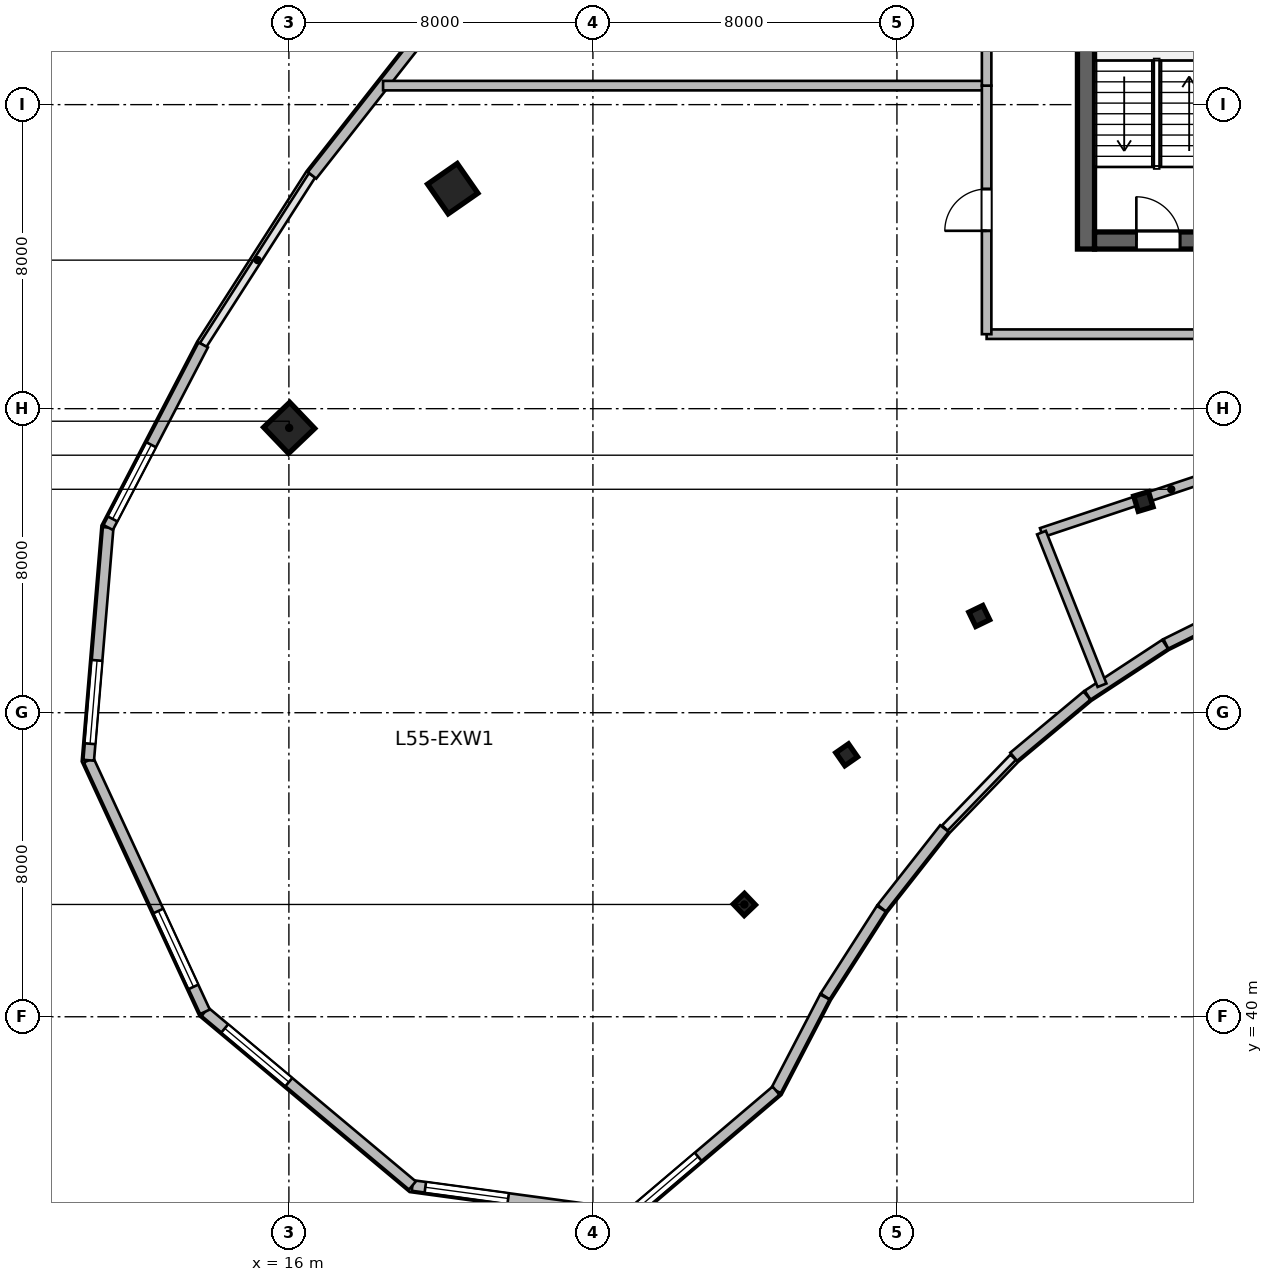
"""IFC4 building model, lengths in metres.
Left out: names, types, materials, properties, quantities, classifications, styles, units other than length and angle.
Written with IfcOpenShell. Run it as: python <this file> out.ifc"""

import sys

from ifc_helpers import new_model, si_unit, direction, frame, frame_2d, origin, origin_2d, place, context, subcontext, project, spatial, rectangle, i_section, extrude, source, transform, mapped, element, fill, save


model = new_model("IFC4")
c1 = context("Model", 3, precision=1e-05, world=origin(), true_north=direction((0.0, 1.0)))
c2 = subcontext(c1, "Body", "Model", "MODEL_VIEW")
j1 = project(units=[si_unit("LENGTHUNIT", "METRE"), si_unit("PLANEANGLEUNIT", "RADIAN")], contexts=[c1])
p1 = place(None, origin())
s1 = spatial("IfcSite", under=j1, at=p1, CompositionType="ELEMENT")
p2 = place(p1, origin())
s2 = spatial("IfcBuilding", under=s1, at=p2, CompositionType="ELEMENT")
p3 = place(p2, frame((0.0, 0.0, 227.4)))
s3 = spatial("IfcBuildingStorey", under=s2, at=p3, CompositionType="ELEMENT", Elevation=227.4)
m1 = source(origin(), c2, "Body", "SweptSolid", [
    extrude(rectangle(XDim=12.0, YDim=0.45, at=frame_2d((6.0, 0.0))), origin(), (0.0, 0.0, 1.0), 3.9),
])
p4 = place(p3, frame((36.975, 60.2, 0.0), z_axis=(0.0, 0.0, 1.0), x_axis=(0.0, 1.0, 0.0)))
e1 = element("IfcWall", 1, at=p4, inside=s3, PredefinedType="SHEAR", context=c2, shape_type="MappedRepresentation", body=[
    mapped(m1, transform((0.0, 0.0, 0.0), scale=1.0)),
])
m2 = source(origin(), c2, "Body", "SweptSolid", [
    extrude(rectangle(XDim=21.6, YDim=0.45, at=frame_2d((10.8, 0.0))), origin(), (0.0, 0.0, 1.0), 3.9),
])
p5 = place(p3, frame((37.2, 60.425, 0.0), z_axis=(0.0, 0.0, 1.0), x_axis=(1.0, 0.0, 0.0)))
e2 = element("IfcWall", 2, at=p5, inside=s3, PredefinedType="SHEAR", context=c2, shape_type="MappedRepresentation", body=[
    mapped(m2, transform((0.0, 0.0, 0.0), scale=1.0)),
])
p6 = place(p5, frame((1.1, 0.0, 0.0)))
e3 = element("IfcOpeningElement", 3, at=p6, cuts=e2, PredefinedType="OPENING", context=c2, shape_type="SweptSolid", body=[
    extrude(rectangle(XDim=1.15, YDim=2.15, at=frame_2d((0.575, 1.075))), frame((0.0, 0.235, 0.0), z_axis=(0.0, -1.0, 0.0), x_axis=(1.0, 0.0, 0.0)), (0.0, 0.0, 1.0), 0.47),
])
p7 = place(p5, frame((19.5, 0.0, 0.0)))
e4 = element("IfcOpeningElement", 4, at=p7, cuts=e2, PredefinedType="OPENING", context=c2, shape_type="SweptSolid", body=[
    extrude(rectangle(XDim=0.9, YDim=2.1, at=frame_2d((0.45, 1.05))), frame((0.0, 0.235, 0.0), z_axis=(0.0, -1.0, 0.0), x_axis=(1.0, 0.0, 0.0)), (0.0, 0.0, 1.0), 0.47),
])
p8 = place(p5, frame((12.02, 0.0, 0.0)))
e5 = element("IfcOpeningElement", 5, at=p8, cuts=e2, PredefinedType="OPENING", context=c2, shape_type="SweptSolid", body=[
    extrude(rectangle(XDim=1.6, YDim=2.15, at=frame_2d((0.8, 1.075))), frame((0.0, 0.235, 0.0), z_axis=(0.0, -1.0, 0.0), x_axis=(1.0, 0.0, 0.0)), (0.0, 0.0, 1.0), 0.47),
])
m3 = source(origin(), c2, "Body", "SweptSolid", [
    extrude(i_section(OverallWidth=0.406, OverallDepth=0.416, WebThickness=0.03, FlangeThickness=0.048, at=origin_2d()), origin(), (0.0, 0.0, 1.0), 3.9),
])
p9 = place(p3, frame((27.985, 42.955, 0.0), z_axis=(0.0, 0.0, 1.0), x_axis=(-0.690756218984, 0.723087716626, 0.0)))
e6 = element("IfcColumn", 6, at=p9, inside=s3, PredefinedType="COLUMN", context=c2, shape_type="MappedRepresentation", body=[
    mapped(m3, transform((0.0, 0.0, 0.0), scale=1.0)),
])
m4 = source(origin(), c2, "Body", "SweptSolid", [
    extrude(rectangle(XDim=0.95, YDim=0.95, at=origin_2d()), origin(), (0.0, 0.0, 1.0), 3.9),
])
p10 = place(p3, frame((16.007, 55.494, 0.0), z_axis=(0.0, 0.0, 1.0), x_axis=(-0.690756218984, 0.723087716626, 0.0)))
e7 = element("IfcColumn", 7, at=p10, inside=s3, PredefinedType="COLUMN", context=c2, shape_type="MappedRepresentation", body=[
    mapped(m4, transform((0.0, 0.0, 0.0), scale=1.0)),
])
p11 = place(p3, frame((30.677, 46.892, 0.0), z_axis=(0.0, 0.0, 1.0), x_axis=(-0.571143442153, 0.820850271661, 0.0)))
e8 = element("IfcColumn", 8, at=p11, inside=s3, PredefinedType="COLUMN", context=c2, shape_type="MappedRepresentation", body=[
    mapped(m3, transform((0.0, 0.0, 0.0), scale=1.0)),
])
p12 = place(p3, frame((20.311, 61.789, 0.0), z_axis=(0.0, 0.0, 1.0), x_axis=(-0.571143442153, 0.820850271661, 0.0)))
e9 = element("IfcColumn", 9, at=p12, inside=s3, PredefinedType="COLUMN", context=c2, shape_type="MappedRepresentation", body=[
    mapped(m4, transform((0.0, 0.0, 0.0), scale=1.0)),
])
for number, where, z_axis, x_axis in (
    (10, (34.166, 50.545, 0.0), (0.0, 0.0, 1.0), (-0.436, 0.9, 0.0)),
    (11, (38.485, 53.558, 0.0), (0.0, 0.0, 1.0), (-0.289, 0.957, 0.0)),
):
    element("IfcColumn", number, at=place(p3, frame(where, z_axis=z_axis, x_axis=x_axis)), inside=s3, PredefinedType="COLUMN", context=c2, shape_type="MappedRepresentation", body=[
        mapped(m3, transform((0.0, 0.0, 0.0), scale=1.0)),
    ])
m5 = source(origin(), c2, "Body", "SweptSolid", [
    extrude(rectangle(XDim=2.378, YDim=0.28, at=frame_2d((1.189, 0.0))), origin(), (0.0, 0.0, 1.0), 3.65),
])
p13 = place(p3, frame((41.207, 50.868, 0.0), z_axis=(0.0, 0.0, 1.0), x_axis=(-0.895941616831, -0.444171835252, 0.0)))
e12 = element("IfcWall", 12, at=p13, inside=s3, PredefinedType="SOLIDWALL", context=c2, shape_type="MappedRepresentation", body=[
    mapped(m5, transform((0.0, 0.0, 0.0), scale=1.0)),
])
m6 = source(origin(), c2, "Body", "SweptSolid", [
    extrude(rectangle(XDim=2.44, YDim=0.28, at=frame_2d((1.22, 0.0))), origin(), (0.0, 0.0, 1.0), 3.65),
])
p14 = place(p3, frame((39.057, 49.801, 0.0), z_axis=(0.0, 0.0, 1.0), x_axis=(-0.83598480459, -0.548752591333, 0.0)))
e13 = element("IfcWall", 13, at=p14, inside=s3, PredefinedType="SOLIDWALL", context=c2, shape_type="MappedRepresentation", body=[
    mapped(m6, transform((0.0, 0.0, 0.0), scale=1.0)),
])
m7 = source(origin(), c2, "Body", "SweptSolid", [
    extrude(rectangle(XDim=2.511, YDim=0.28, at=frame_2d((1.256, 0.0))), origin(), (0.0, 0.0, 1.0), 3.65),
])
p15 = place(p3, frame((37.001, 48.449, 0.0), z_axis=(0.0, 0.0, 1.0), x_axis=(-0.767910416122, -0.640557251782, 0.0)))
e14 = element("IfcWall", 14, at=p15, inside=s3, PredefinedType="SOLIDWALL", context=c2, shape_type="MappedRepresentation", body=[
    mapped(m7, transform((0.0, 0.0, 0.0), scale=1.0)),
])
m8 = source(origin(), c2, "Body", "SweptSolid", [
    extrude(rectangle(XDim=2.666, YDim=0.28, at=frame_2d((1.333, 0.0))), origin(), (0.0, 0.0, 1.0), 3.65),
])
p16 = place(p3, frame((33.249, 44.952, 0.0), z_axis=(0.0, 0.0, 1.0), x_axis=(-0.618161284122, -0.786051287648, 0.0)))
e15 = element("IfcWall", 15, at=p16, inside=s3, PredefinedType="SOLIDWALL", context=c2, shape_type="MappedRepresentation", body=[
    mapped(m8, transform((0.0, 0.0, 0.0), scale=1.0)),
])
m9 = source(origin(), c2, "Body", "SweptSolid", [
    extrude(rectangle(XDim=2.742, YDim=0.28, at=frame_2d((1.371, 0.0))), origin(), (0.0, 0.0, 1.0), 3.65),
])
p17 = place(p3, frame((31.591, 42.843, 0.0), z_axis=(0.0, 0.0, 1.0), x_axis=(-0.540172468355, -0.841554338371, 0.0)))
e16 = element("IfcWall", 16, at=p17, inside=s3, PredefinedType="SOLIDWALL", context=c2, shape_type="MappedRepresentation", body=[
    mapped(m9, transform((0.0, 0.0, 0.0), scale=1.0)),
])
m10 = source(origin(), c2, "Body", "SweptSolid", [
    extrude(rectangle(XDim=2.779, YDim=0.28, at=frame_2d((1.39, 0.0))), origin(), (0.0, 0.0, 1.0), 3.65),
])
p18 = place(p3, frame((30.101, 40.521, 0.0), z_axis=(0.0, 0.0, 1.0), x_axis=(-0.461770308601, -0.886999538948, 0.0)))
e17 = element("IfcWall", 17, at=p18, inside=s3, PredefinedType="SOLIDWALL", context=c2, shape_type="MappedRepresentation", body=[
    mapped(m10, transform((0.0, 0.0, 0.0), scale=1.0)),
])
m11 = source(origin(), c2, "Body", "SweptSolid", [
    extrude(rectangle(XDim=5.051, YDim=0.28, at=frame_2d((2.525, 0.0))), origin(), (0.0, 0.0, 1.0), 3.65),
])
p19 = place(p3, frame((28.818, 38.056, 0.0), z_axis=(0.0, 0.0, 1.0), x_axis=(-0.761904731537, -0.647689107568, 0.0)))
e18 = element("IfcWall", 18, at=p19, inside=s3, PredefinedType="SOLIDWALL", context=c2, shape_type="MappedRepresentation", body=[
    mapped(m11, transform((0.0, 0.0, 0.0), scale=1.0)),
])
p20 = place(p19, frame((2.688, 0.0, 0.95)))
e19 = element("IfcOpeningElement", 19, at=p20, cuts=e18, PredefinedType="OPENING", context=c2, shape_type="SweptSolid", body=[
    extrude(rectangle(XDim=2.2, YDim=2.1, at=frame_2d((1.1, 1.05))), frame((0.0, 0.15, 0.0), z_axis=(0.0, -1.0, 0.0), x_axis=(1.0, 0.0, 0.0)), (0.0, 0.0, 1.0), 0.3),
])
m12 = source(origin(), c2, "Body", "SweptSolid", [
    extrude(rectangle(XDim=5.771, YDim=0.28, at=frame_2d((2.886, 0.0))), origin(), (0.0, 0.0, 1.0), 3.65),
])
p21 = place(p3, frame((24.969, 34.784, 0.0), z_axis=(0.0, 0.0, 1.0), x_axis=(-0.990933615537, 0.134352408237, 0.0)))
e20 = element("IfcWall", 20, at=p21, inside=s3, PredefinedType="SOLIDWALL", context=c2, shape_type="MappedRepresentation", body=[
    mapped(m12, transform((0.0, 0.0, 0.0), scale=1.0)),
])
p22 = place(p21, frame((3.229, 0.0, 0.95)))
e21 = element("IfcOpeningElement", 21, at=p22, cuts=e20, PredefinedType="OPENING", context=c2, shape_type="SweptSolid", body=[
    extrude(rectangle(XDim=2.2, YDim=2.1, at=frame_2d((1.1, 1.05))), frame((0.0, 0.15, 0.0), z_axis=(0.0, -1.0, 0.0), x_axis=(1.0, 0.0, 0.0)), (0.0, 0.0, 1.0), 0.3),
])
m13 = source(origin(), c2, "Body", "SweptSolid", [
    extrude(rectangle(XDim=7.12, YDim=0.28, at=frame_2d((3.56, 0.0))), origin(), (0.0, 0.0, 1.0), 3.65),
])
p23 = place(p3, frame((19.25, 35.56, 0.0), z_axis=(0.0, 0.0, 1.0), x_axis=(-0.766709783564, 0.641993853387, 0.0)))
e22 = element("IfcWall", 22, at=p23, inside=s3, PredefinedType="SOLIDWALL", context=c2, shape_type="MappedRepresentation", body=[
    mapped(m13, transform((0.0, 0.0, 0.0), scale=1.0)),
])
p24 = place(p23, frame((4.24, 0.0, 0.95)))
e23 = element("IfcOpeningElement", 23, at=p24, cuts=e22, PredefinedType="OPENING", context=c2, shape_type="SweptSolid", body=[
    extrude(rectangle(XDim=2.2, YDim=2.1, at=frame_2d((1.1, 1.05))), frame((0.0, 0.15, 0.0), z_axis=(0.0, -1.0, 0.0), x_axis=(1.0, 0.0, 0.0)), (0.0, 0.0, 1.0), 0.3),
])
m14 = source(origin(), c2, "Body", "SweptSolid", [
    extrude(rectangle(XDim=7.292, YDim=0.28, at=frame_2d((3.646, 0.0))), origin(), (0.0, 0.0, 1.0), 3.65),
])
p25 = place(p3, frame((13.792, 40.131, 0.0), z_axis=(0.0, 0.0, 1.0), x_axis=(-0.419642001049, 0.907689699708, 0.0)))
e24 = element("IfcWall", 24, at=p25, inside=s3, PredefinedType="SOLIDWALL", context=c2, shape_type="MappedRepresentation", body=[
    mapped(m14, transform((0.0, 0.0, 0.0), scale=1.0)),
])
p26 = place(p25, frame((0.723, 0.0, 0.95)))
e25 = element("IfcOpeningElement", 25, at=p26, cuts=e24, PredefinedType="OPENING", context=c2, shape_type="SweptSolid", body=[
    extrude(rectangle(XDim=2.2, YDim=2.1, at=frame_2d((1.1, 1.05))), frame((0.0, 0.15, 0.0), z_axis=(0.0, -1.0, 0.0), x_axis=(1.0, 0.0, 0.0)), (0.0, 0.0, 1.0), 0.3),
])
m15 = source(origin(), c2, "Body", "SweptSolid", [
    extrude(rectangle(XDim=6.146, YDim=0.28, at=frame_2d((3.073, 0.0))), origin(), (0.0, 0.0, 1.0), 3.65),
])
p27 = place(p3, frame((10.732, 46.749, 0.0), z_axis=(0.0, 0.0, 1.0), x_axis=(0.083301904456, 0.996524356307, 0.0)))
e26 = element("IfcWall", 26, at=p27, inside=s3, PredefinedType="SOLIDWALL", context=c2, shape_type="MappedRepresentation", body=[
    mapped(m15, transform((0.0, 0.0, 0.0), scale=1.0)),
])
p28 = place(p27, frame((0.436, 0.0, 0.95)))
e27 = element("IfcOpeningElement", 27, at=p28, cuts=e26, PredefinedType="OPENING", context=c2, shape_type="SweptSolid", body=[
    extrude(rectangle(XDim=2.2, YDim=2.1, at=frame_2d((1.1, 1.05))), frame((0.0, 0.15, 0.0), z_axis=(0.0, -1.0, 0.0), x_axis=(1.0, 0.0, 0.0)), (0.0, 0.0, 1.0), 0.3),
])
m16 = source(origin(), c2, "Body", "SweptSolid", [
    extrude(rectangle(XDim=5.416, YDim=0.28, at=frame_2d((2.708, 0.0))), origin(), (0.0, 0.0, 1.0), 3.65),
])
p29 = place(p3, frame((11.244, 52.874, 0.0), z_axis=(0.0, 0.0, 1.0), x_axis=(0.46177852435, 0.886995261796, 0.0)))
e28 = element("IfcWall", 28, at=p29, inside=s3, PredefinedType="SOLIDWALL", context=c2, shape_type="MappedRepresentation", body=[
    mapped(m16, transform((0.0, 0.0, 0.0), scale=1.0)),
])
p30 = place(p29, frame((0.254, 0.0, 0.95)))
e29 = element("IfcOpeningElement", 29, at=p30, cuts=e28, PredefinedType="OPENING", context=c2, shape_type="SweptSolid", body=[
    extrude(rectangle(XDim=2.2, YDim=2.1, at=frame_2d((1.1, 1.05))), frame((0.0, 0.15, 0.0), z_axis=(0.0, -1.0, 0.0), x_axis=(1.0, 0.0, 0.0)), (0.0, 0.0, 1.0), 0.3),
])
m17 = source(origin(), c2, "Body", "SweptSolid", [
    extrude(rectangle(XDim=5.153, YDim=0.28, at=frame_2d((2.577, 0.0))), origin(), (0.0, 0.0, 1.0), 3.65),
])
p31 = place(p3, frame((16.609, 62.14, 0.0), z_axis=(0.0, 0.0, 1.0), x_axis=(0.618179283891, 0.786037132054, 0.0)))
e30 = element("IfcWall", 30, at=p31, inside=s3, PredefinedType="SOLIDWALL", context=c2, shape_type="MappedRepresentation", body=[
    mapped(m17, transform((0.0, 0.0, 0.0), scale=1.0)),
])
m18 = source(origin(), c2, "Body", "SweptSolid", [
    extrude(rectangle(XDim=12.86, YDim=0.25, at=frame_2d((6.43, 0.0))), origin(), (0.0, 0.0, 1.0), 3.095),
])
p32 = place(p3, frame((35.803, 52.738, 0.0), z_axis=(0.0, 0.0, 1.0), x_axis=(0.948466647997, 0.316876975554, 0.0)))
e31 = element("IfcWall", 31, at=p32, inside=s3, PredefinedType="PARTITIONING", context=c2, shape_type="MappedRepresentation", body=[
    mapped(m18, transform((0.0, 0.0, 0.0), scale=1.0)),
])
p33 = place(p32, frame((5.88, 0.0, 0.0)))
e32 = element("IfcOpeningElement", 32, at=p33, cuts=e31, PredefinedType="OPENING", context=c2, shape_type="SweptSolid", body=[
    extrude(rectangle(XDim=1.1, YDim=2.15, at=frame_2d((0.55, 1.075))), frame((0.0, 0.135, 0.0), z_axis=(0.0, -1.0, 0.0), x_axis=(1.0, 0.0, 0.0)), (0.0, 0.0, 1.0), 0.27),
])
m19 = source(origin(), c2, "Body", "SweptSolid", [
    extrude(rectangle(XDim=4.32, YDim=0.25, at=frame_2d((2.16, 0.0))), origin(), (0.0, 0.0, 1.0), 3.65),
])
p34 = place(p3, frame((37.396, 48.723, 0.0), z_axis=(0.0, 0.0, 1.0), x_axis=(-0.368846295269, 0.929490403644, 0.0)))
e33 = element("IfcWall", 33, at=p34, inside=s3, PredefinedType="PARTITIONING", context=c2, shape_type="MappedRepresentation", body=[
    mapped(m19, transform((0.0, 0.0, 0.0), scale=1.0)),
])
m20 = source(origin(), c2, "Body", "SweptSolid", [
    extrude(rectangle(XDim=12.39, YDim=0.25, at=frame_2d((6.195, 0.0))), origin(), (0.0, 0.0, 1.0), 3.217),
])
p35 = place(p3, frame((34.36, 57.96, 0.0), z_axis=(0.0, 0.0, 1.0), x_axis=(1.0, 0.0, 0.0)))
e34 = element("IfcWall", 34, at=p35, inside=s3, PredefinedType="PARTITIONING", context=c2, shape_type="MappedRepresentation", body=[
    mapped(m20, transform((0.0, 0.0, 0.0), scale=1.0)),
])
m21 = source(origin(), c2, "Body", "SweptSolid", [
    extrude(rectangle(XDim=15.882, YDim=0.25, at=frame_2d((7.941, 0.0))), origin(), (0.0, 0.0, 1.0), 3.65),
])
p36 = place(p3, frame((18.478, 64.5, 0.0), z_axis=(0.0, 0.0, 1.0), x_axis=(1.0, 0.0, 0.0)))
e35 = element("IfcWall", 35, at=p36, inside=s3, PredefinedType="PARTITIONING", context=c2, shape_type="MappedRepresentation", body=[
    mapped(m21, transform((0.0, 0.0, 0.0), scale=1.0)),
])
m22 = source(origin(), c2, "Body", "SweptSolid", [
    extrude(rectangle(XDim=6.54, YDim=0.25, at=frame_2d((3.27, 0.0))), origin(), (0.0, 0.0, 1.0), 3.65),
])
p37 = place(p3, frame((34.36, 57.96, 0.0), z_axis=(0.0, 0.0, 1.0), x_axis=(0.0, 1.0, 0.0)))
e36 = element("IfcWall", 36, at=p37, inside=s3, PredefinedType="PARTITIONING", context=c2, shape_type="MappedRepresentation", body=[
    mapped(m22, transform((0.0, 0.0, 0.0), scale=1.0)),
])
p38 = place(p37, frame((2.72, 0.0, 0.0)))
e37 = element("IfcOpeningElement", 37, at=p38, cuts=e36, PredefinedType="OPENING", context=c2, shape_type="SweptSolid", body=[
    extrude(rectangle(XDim=1.1, YDim=2.15, at=frame_2d((0.55, 1.075))), frame((0.0, 0.135, 0.0), z_axis=(0.0, -1.0, 0.0), x_axis=(1.0, 0.0, 0.0)), (0.0, 0.0, 1.0), 0.27),
])
m23 = source(origin(), c2, "Body", "SweptSolid", [
    extrude(rectangle(XDim=12.669, YDim=0.25, at=frame_2d((6.334, 0.0))), origin(), (0.0, 0.0, 1.0), 3.65),
])
p39 = place(p3, frame((34.36, 64.5, 0.0), z_axis=(0.0, 0.0, 1.0), x_axis=(0.0, 1.0, 0.0)))
e38 = element("IfcWall", 38, at=p39, inside=s3, PredefinedType="PARTITIONING", context=c2, shape_type="MappedRepresentation", body=[
    mapped(m23, transform((0.0, 0.0, 0.0), scale=1.0)),
])
p40 = place(p39, frame((5.784, 0.0, 0.0)))
e39 = element("IfcOpeningElement", 39, at=p40, cuts=e38, PredefinedType="OPENING", context=c2, shape_type="SweptSolid", body=[
    extrude(rectangle(XDim=1.1, YDim=2.15, at=frame_2d((0.55, 1.075))), frame((0.0, 0.135, 0.0), z_axis=(0.0, -1.0, 0.0), x_axis=(1.0, 0.0, 0.0)), (0.0, 0.0, 1.0), 0.27),
])
m24 = source(origin(), c2, "Body", "SweptSolid", [
    extrude(rectangle(XDim=2.2, YDim=2.1, at=frame_2d((1.1, 1.05))), frame((0.0, 0.03, 0.0), z_axis=(0.0, -1.0, 0.0), x_axis=(1.0, 0.0, 0.0)), (0.0, 0.0, 1.0), 0.06),
])
p41 = place(p20, origin())
e40 = element("IfcWindow", 40, at=p41, inside=s3, PartitioningType="TRIPLE_PANEL_VERTICAL", PredefinedType="WINDOW", context=c2, shape_type="MappedRepresentation", body=[
    mapped(m24, transform((0.0, 0.0, 0.0), scale=1.0)),
])
fill(e19, e40)
p42 = place(p22, origin())
e41 = element("IfcWindow", 41, at=p42, inside=s3, PartitioningType="TRIPLE_PANEL_VERTICAL", PredefinedType="WINDOW", context=c2, shape_type="MappedRepresentation", body=[
    mapped(m24, transform((0.0, 0.0, 0.0), scale=1.0)),
])
fill(e21, e41)
p43 = place(p24, origin())
e42 = element("IfcWindow", 42, at=p43, inside=s3, PartitioningType="TRIPLE_PANEL_VERTICAL", PredefinedType="WINDOW", context=c2, shape_type="MappedRepresentation", body=[
    mapped(m24, transform((0.0, 0.0, 0.0), scale=1.0)),
])
fill(e23, e42)
p44 = place(p26, origin())
e43 = element("IfcWindow", 43, at=p44, inside=s3, PartitioningType="TRIPLE_PANEL_VERTICAL", PredefinedType="WINDOW", context=c2, shape_type="MappedRepresentation", body=[
    mapped(m24, transform((0.0, 0.0, 0.0), scale=1.0)),
])
fill(e25, e43)
p45 = place(p28, origin())
e44 = element("IfcWindow", 44, at=p45, inside=s3, PartitioningType="TRIPLE_PANEL_VERTICAL", PredefinedType="WINDOW", context=c2, shape_type="MappedRepresentation", body=[
    mapped(m24, transform((0.0, 0.0, 0.0), scale=1.0)),
])
fill(e27, e44)
p46 = place(p30, origin())
e45 = element("IfcWindow", 45, at=p46, inside=s3, PartitioningType="TRIPLE_PANEL_VERTICAL", PredefinedType="WINDOW", context=c2, shape_type="MappedRepresentation", body=[
    mapped(m24, transform((0.0, 0.0, 0.0), scale=1.0)),
])
fill(e29, e45)
m25 = source(origin(), c2, "Body", "SweptSolid", [
    extrude(rectangle(XDim=1.15, YDim=2.15, at=frame_2d((0.575, 1.075))), frame((0.0, 0.025, 0.0), z_axis=(0.0, -1.0, 0.0), x_axis=(1.0, 0.0, 0.0)), (0.0, 0.0, 1.0), 0.05),
])
p47 = place(p6, origin())
e46 = element("IfcDoor", 46, at=p47, inside=s3, OperationType="SINGLE_SWING_LEFT", PredefinedType="DOOR", context=c2, shape_type="MappedRepresentation", body=[
    mapped(m25, transform((0.0, 0.0, 0.0), scale=1.0)),
])
fill(e3, e46)
m26 = source(origin(), c2, "Body", "SweptSolid", [
    extrude(rectangle(XDim=1.1, YDim=2.15, at=frame_2d((0.55, 1.075))), frame((0.0, 0.025, 0.0), z_axis=(0.0, -1.0, 0.0), x_axis=(1.0, 0.0, 0.0)), (0.0, 0.0, 1.0), 0.05),
])
p48 = place(p38, origin())
e47 = element("IfcDoor", 47, at=p48, inside=s3, OperationType="SINGLE_SWING_LEFT", PredefinedType="DOOR", context=c2, shape_type="MappedRepresentation", body=[
    mapped(m26, transform((0.0, 0.0, 0.0), scale=1.0)),
])
fill(e37, e47)
save(model, sys.argv[1])
